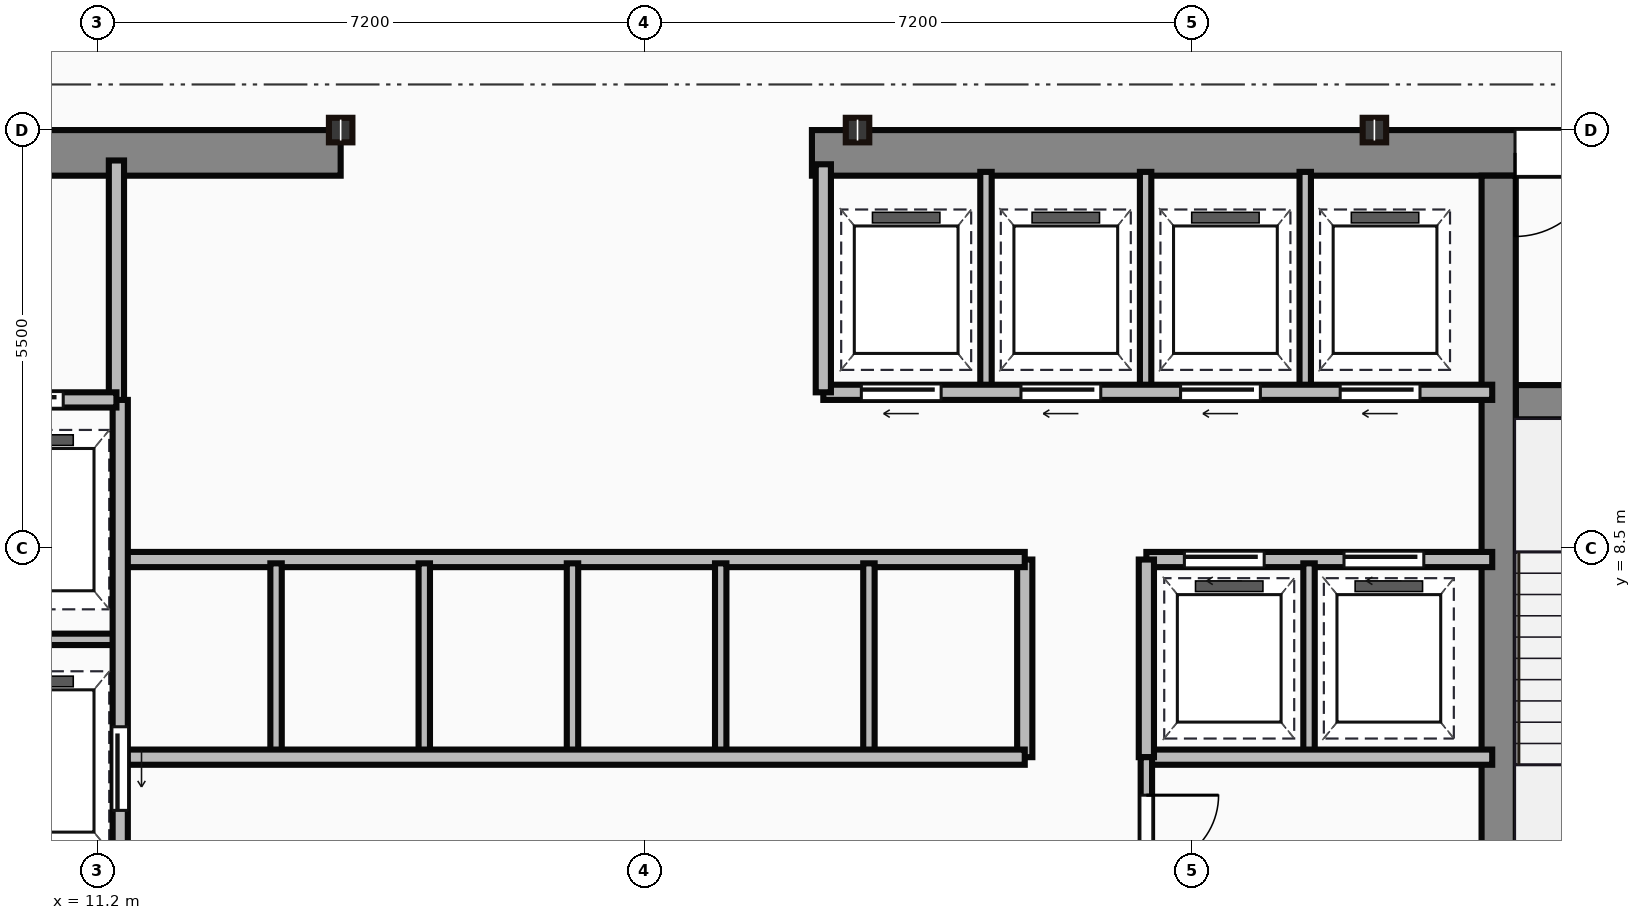
"""IFC4 building model, lengths in metres.
Left out: names, types, materials, properties, quantities, classifications, styles, units other than length and angle.
Written with IfcOpenShell. Run it as: python <this file> out.ifc"""

import sys

from ifc_helpers import new_model, si_unit, direction, frame, frame_2d, origin, origin_2d, place, context, subcontext, project, spatial, rectangle, i_section, extrude, source, transform, mapped, element, fill, save


model = new_model("IFC4")
c1 = context("Model", 3, precision=1e-05, world=origin(), true_north=direction((0.0, 1.0)))
c2 = subcontext(c1, "Body", "Model", "MODEL_VIEW")
j1 = project(units=[si_unit("LENGTHUNIT", "METRE"), si_unit("PLANEANGLEUNIT", "RADIAN")], contexts=[c1])
p1 = place(None, origin())
s1 = spatial("IfcSite", under=j1, at=p1, CompositionType="ELEMENT")
p2 = place(p1, origin())
s2 = spatial("IfcBuilding", under=s1, at=p2, CompositionType="ELEMENT")
p3 = place(p2, frame((0.0, 0.0, 188.6)))
s3 = spatial("IfcBuildingStorey", under=s2, at=p3, CompositionType="ELEMENT", Elevation=188.6)
m1 = source(origin(), c2, "Body", "SweptSolid", [
    extrude(rectangle(XDim=9.1, YDim=0.6, at=frame_2d((4.55, 0.0))), origin(), (0.0, 0.0, 1.0), 3.65),
])
p4 = place(p3, frame((5.3, 13.7, 0.0), z_axis=(0.0, 0.0, 1.0), x_axis=(1.0, 0.0, 0.0)))
e1 = element("IfcWall", 1, at=p4, inside=s3, PredefinedType="SHEAR", context=c2, shape_type="MappedRepresentation", body=[
    mapped(m1, transform((0.0, 0.0, 0.0))),
])
p5 = place(p4, frame((4.1, 0.0, 0.0)))
e2 = element("IfcOpeningElement", 2, at=p5, cuts=e1, PredefinedType="OPENING", context=c2, shape_type="SweptSolid", body=[
    extrude(rectangle(XDim=1.1, YDim=2.15, at=frame_2d((0.55, 1.075))), frame((0.0, 0.31, 0.0), z_axis=(0.0, -1.0, 0.0), x_axis=(1.0, 0.0, 0.0)), (0.0, 0.0, 1.0), 0.62),
])
m2 = source(origin(), c2, "Body", "SweptSolid", [
    extrude(rectangle(XDim=12.6, YDim=0.6, at=frame_2d((6.3, 0.0))), origin(), (0.0, 0.0, 1.0), 3.65),
])
p6 = place(p3, frame((20.6, 13.7, 0.0), z_axis=(0.0, 0.0, 1.0), x_axis=(1.0, 0.0, 0.0)))
e3 = element("IfcWall", 3, at=p6, inside=s3, PredefinedType="SHEAR", context=c2, shape_type="MappedRepresentation", body=[
    mapped(m2, transform((0.0, 0.0, 0.0))),
])
p7 = place(p6, frame((9.25, 0.0, 0.0)))
e4 = element("IfcOpeningElement", 4, at=p7, cuts=e3, PredefinedType="OPENING", context=c2, shape_type="SweptSolid", body=[
    extrude(rectangle(XDim=1.1, YDim=2.15, at=frame_2d((0.55, 1.075))), frame((0.0, 0.31, 0.0), z_axis=(0.0, -1.0, 0.0), x_axis=(1.0, 0.0, 0.0)), (0.0, 0.0, 1.0), 0.62),
])
m3 = source(origin(), c2, "Body", "SweptSolid", [
    extrude(rectangle(XDim=12.5, YDim=0.45, at=frame_2d((6.25, 0.0))), origin(), (0.0, 0.0, 1.0), 3.65),
])
p8 = place(p3, frame((29.635, 0.9, 0.0), z_axis=(0.0, 0.0, 1.0), x_axis=(0.0, 1.0, 0.0)))
e5 = element("IfcWall", 5, at=p8, inside=s3, PredefinedType="SHEAR", context=c2, shape_type="MappedRepresentation", body=[
    mapped(m3, transform((0.0, 0.0, 0.0))),
])
m4 = source(origin(), c2, "Body", "SweptSolid", [
    extrude(rectangle(XDim=3.39, YDim=0.45, at=frame_2d((1.695, 0.0))), origin(), (0.0, 0.0, 1.0), 3.65),
])
p9 = place(p3, frame((29.86, 10.42, 0.0), z_axis=(0.0, 0.0, 1.0), x_axis=(1.0, 0.0, 0.0)))
e6 = element("IfcWall", 6, at=p9, inside=s3, PredefinedType="SHEAR", context=c2, shape_type="MappedRepresentation", body=[
    mapped(m4, transform((0.0, 0.0, 0.0))),
])
p10 = place(p9, frame((1.1, 0.0, 0.0)))
e7 = element("IfcOpeningElement", 7, at=p10, cuts=e6, PredefinedType="OPENING", context=c2, shape_type="SweptSolid", body=[
    extrude(rectangle(XDim=1.1, YDim=2.15, at=frame_2d((0.55, 1.075))), frame((0.0, 0.235, 0.0), z_axis=(0.0, -1.0, 0.0), x_axis=(1.0, 0.0, 0.0)), (0.0, 0.0, 1.0), 0.47),
])
m5 = source(origin(), c2, "Body", "SweptSolid", [
    extrude(i_section(OverallWidth=0.309, OverallDepth=0.323, WebThickness=0.014, FlangeThickness=0.023, at=origin_2d()), origin(), (0.0, 0.0, 1.0), 3.65),
])
for number, where, z_axis, x_axis in (
    (8, (14.4, 14.0, 0.0), (0.0, 0.0, 1.0), (1.0, 0.0, 0.0)),
    (9, (21.2, 14.0, 0.0), (0.0, 0.0, 1.0), (1.0, 0.0, 0.0)),
    (10, (28.0, 14.0, 0.0), (0.0, 0.0, 1.0), (1.0, 0.0, 0.0)),
):
    element("IfcColumn", number, at=place(p3, frame(where, z_axis=z_axis, x_axis=x_axis)), inside=s3, PredefinedType="COLUMN", context=c2, shape_type="MappedRepresentation", body=[
        mapped(m5, transform((0.0, 0.0, 0.0))),
    ])
m6 = source(origin(), c2, "Body", "SweptSolid", [
    extrude(rectangle(XDim=3.18, YDim=0.2, at=frame_2d((1.59, 0.0))), origin(), (0.0, 0.0, 1.0), 3.4),
])
p11 = place(p3, frame((11.45, 10.42, 0.0), z_axis=(0.0, 0.0, 1.0), x_axis=(0.0, 1.0, 0.0)))
e11 = element("IfcWall", 11, at=p11, inside=s3, PredefinedType="PARTITIONING", context=c2, shape_type="MappedRepresentation", body=[
    mapped(m6, transform((0.0, 0.0, 0.0))),
])
m7 = source(origin(), c2, "Body", "SweptSolid", [
    extrude(rectangle(XDim=2.35, YDim=0.2, at=frame_2d((1.175, 0.0))), origin(), (0.0, 0.0, 1.0), 3.4),
])
p12 = place(p3, frame((9.1, 10.45, 0.0), z_axis=(0.0, 0.0, 1.0), x_axis=(1.0, 0.0, 0.0)))
e12 = element("IfcWall", 12, at=p12, inside=s3, PredefinedType="PARTITIONING", context=c2, shape_type="MappedRepresentation", body=[
    mapped(m7, transform((0.0, 0.0, 0.0))),
])
p13 = place(p12, frame((0.55, 0.0, 0.0)))
e13 = element("IfcOpeningElement", 13, at=p13, cuts=e12, PredefinedType="OPENING", context=c2, shape_type="SweptSolid", body=[
    extrude(rectangle(XDim=1.1, YDim=2.15, at=frame_2d((0.55, 1.075))), frame((0.0, 0.11, 0.0), z_axis=(0.0, -1.0, 0.0), x_axis=(1.0, 0.0, 0.0)), (0.0, 0.0, 1.0), 0.22),
])
m8 = source(origin(), c2, "Body", "SweptSolid", [
    extrude(rectangle(XDim=9.6, YDim=0.2, at=frame_2d((4.8, 0.0))), origin(), (0.0, 0.0, 1.0), 3.4),
])
p14 = place(p3, frame((11.5, 0.85, 0.0), z_axis=(0.0, 0.0, 1.0), x_axis=(0.0, 1.0, 0.0)))
e14 = element("IfcWall", 14, at=p14, inside=s3, PredefinedType="PARTITIONING", context=c2, shape_type="MappedRepresentation", body=[
    mapped(m8, transform((0.0, 0.0, 0.0))),
])
p15 = place(p14, frame((4.2, 0.0, 0.0)))
e15 = element("IfcOpeningElement", 15, at=p15, cuts=e14, PredefinedType="OPENING", context=c2, shape_type="SweptSolid", body=[
    extrude(rectangle(XDim=1.1, YDim=2.15, at=frame_2d((0.55, 1.075))), frame((0.0, 0.11, 0.0), z_axis=(0.0, -1.0, 0.0), x_axis=(1.0, 0.0, 0.0)), (0.0, 0.0, 1.0), 0.22),
])
p16 = place(p14, frame((0.9, 0.0, 0.0)))
e16 = element("IfcOpeningElement", 16, at=p16, cuts=e14, PredefinedType="OPENING", context=c2, shape_type="SweptSolid", body=[
    extrude(rectangle(XDim=1.2, YDim=2.15, at=frame_2d((0.6, 1.075))), frame((0.0, 0.11, 0.0), z_axis=(0.0, -1.0, 0.0), x_axis=(1.0, 0.0, 0.0)), (0.0, 0.0, 1.0), 0.22),
])
m9 = source(origin(), c2, "Body", "SweptSolid", [
    extrude(rectangle(XDim=2.4, YDim=0.15, at=frame_2d((1.2, 0.0))), origin(), (0.0, 0.0, 1.0), 3.4),
])
p17 = place(p3, frame((9.1, 7.3, 0.0), z_axis=(0.0, 0.0, 1.0), x_axis=(1.0, 0.0, 0.0)))
e17 = element("IfcWall", 17, at=p17, inside=s3, PredefinedType="PARTITIONING", context=c2, shape_type="MappedRepresentation", body=[
    mapped(m9, transform((0.0, 0.0, 0.0))),
])
m10 = source(origin(), c2, "Body", "SweptSolid", [
    extrude(rectangle(XDim=11.85, YDim=0.2, at=frame_2d((5.925, 0.0))), origin(), (0.0, 0.0, 1.0), 3.4),
])
for number, where, z_axis, x_axis in (
    (18, (11.55, 5.75, 0.0), (0.0, 0.0, 1.0), (1.0, 0.0, 0.0)),
    (19, (11.55, 8.35, 0.0), (0.0, 0.0, 1.0), (1.0, 0.0, 0.0)),
):
    element("IfcWall", number, at=place(p3, frame(where, z_axis=z_axis, x_axis=x_axis)), inside=s3, PredefinedType="PARTITIONING", context=c2, shape_type="MappedRepresentation", body=[
        mapped(m10, transform((0.0, 0.0, 0.0))),
    ])
m11 = source(origin(), c2, "Body", "SweptSolid", [
    extrude(rectangle(XDim=2.6, YDim=0.2, at=frame_2d((1.3, 0.0))), origin(), (0.0, 0.0, 1.0), 3.4),
])
p18 = place(p3, frame((23.4, 5.75, 0.0), z_axis=(0.0, 0.0, 1.0), x_axis=(0.0, 1.0, 0.0)))
e20 = element("IfcWall", 20, at=p18, inside=s3, PredefinedType="PARTITIONING", context=c2, shape_type="MappedRepresentation", body=[
    mapped(m11, transform((0.0, 0.0, 0.0))),
])
m12 = source(origin(), c2, "Body", "SweptSolid", [
    extrude(rectangle(XDim=2.5, YDim=0.15, at=frame_2d((1.25, 0.0))), origin(), (0.0, 0.0, 1.0), 3.4),
])
for number, where, z_axis, x_axis in (
    (21, (13.55, 5.8, 0.0), (0.0, 0.0, 1.0), (0.0, 1.0, 0.0)),
    (22, (15.5, 5.8, 0.0), (0.0, 0.0, 1.0), (0.0, 1.0, 0.0)),
    (23, (17.45, 5.8, 0.0), (0.0, 0.0, 1.0), (0.0, 1.0, 0.0)),
    (24, (19.4, 5.8, 0.0), (0.0, 0.0, 1.0), (0.0, 1.0, 0.0)),
    (25, (21.35, 5.8, 0.0), (0.0, 0.0, 1.0), (0.0, 1.0, 0.0)),
):
    element("IfcWall", number, at=place(p3, frame(where, z_axis=z_axis, x_axis=x_axis)), inside=s3, PredefinedType="PARTITIONING", context=c2, shape_type="MappedRepresentation", body=[
        mapped(m12, transform((0.0, 0.0, 0.0))),
    ])
m13 = source(origin(), c2, "Body", "SweptSolid", [
    extrude(rectangle(XDim=8.8, YDim=0.2, at=frame_2d((4.4, 0.0))), origin(), (0.0, 0.0, 1.0), 3.4),
])
p19 = place(p3, frame((20.75, 10.55, 0.0), z_axis=(0.0, 0.0, 1.0), x_axis=(1.0, 0.0, 0.0)))
e26 = element("IfcWall", 26, at=p19, inside=s3, PredefinedType="PARTITIONING", context=c2, shape_type="MappedRepresentation", body=[
    mapped(m13, transform((0.0, 0.0, 0.0))),
])
p20 = place(p19, frame((0.5, 0.0, 0.0)))
e27 = element("IfcOpeningElement", 27, at=p20, cuts=e26, PredefinedType="OPENING", context=c2, shape_type="SweptSolid", body=[
    extrude(rectangle(XDim=1.05, YDim=2.15, at=frame_2d((0.525, 1.075))), frame((0.0, 0.11, 0.0), z_axis=(0.0, -1.0, 0.0), x_axis=(1.0, 0.0, 0.0)), (0.0, 0.0, 1.0), 0.22),
])
p21 = place(p19, frame((2.6, 0.0, 0.0)))
e28 = element("IfcOpeningElement", 28, at=p21, cuts=e26, PredefinedType="OPENING", context=c2, shape_type="SweptSolid", body=[
    extrude(rectangle(XDim=1.05, YDim=2.15, at=frame_2d((0.525, 1.075))), frame((0.0, 0.11, 0.0), z_axis=(0.0, -1.0, 0.0), x_axis=(1.0, 0.0, 0.0)), (0.0, 0.0, 1.0), 0.22),
])
p22 = place(p19, frame((4.7, 0.0, 0.0)))
e29 = element("IfcOpeningElement", 29, at=p22, cuts=e26, PredefinedType="OPENING", context=c2, shape_type="SweptSolid", body=[
    extrude(rectangle(XDim=1.05, YDim=2.15, at=frame_2d((0.525, 1.075))), frame((0.0, 0.11, 0.0), z_axis=(0.0, -1.0, 0.0), x_axis=(1.0, 0.0, 0.0)), (0.0, 0.0, 1.0), 0.22),
])
p23 = place(p19, frame((6.8, 0.0, 0.0)))
e30 = element("IfcOpeningElement", 30, at=p23, cuts=e26, PredefinedType="OPENING", context=c2, shape_type="SweptSolid", body=[
    extrude(rectangle(XDim=1.05, YDim=2.15, at=frame_2d((0.525, 1.075))), frame((0.0, 0.11, 0.0), z_axis=(0.0, -1.0, 0.0), x_axis=(1.0, 0.0, 0.0)), (0.0, 0.0, 1.0), 0.22),
])
m14 = source(origin(), c2, "Body", "SweptSolid", [
    extrude(rectangle(XDim=3.0, YDim=0.2, at=frame_2d((1.5, 0.0))), origin(), (0.0, 0.0, 1.0), 3.4),
])
p24 = place(p3, frame((20.75, 10.55, 0.0), z_axis=(0.0, 0.0, 1.0), x_axis=(0.0, 1.0, 0.0)))
e31 = element("IfcWall", 31, at=p24, inside=s3, PredefinedType="PARTITIONING", context=c2, shape_type="MappedRepresentation", body=[
    mapped(m14, transform((0.0, 0.0, 0.0))),
])
m15 = source(origin(), c2, "Body", "SweptSolid", [
    extrude(rectangle(XDim=2.85, YDim=0.15, at=frame_2d((1.425, 0.0))), origin(), (0.0, 0.0, 1.0), 3.4),
])
for number, where, z_axis, x_axis in (
    (32, (22.89, 10.6, 0.0), (0.0, 0.0, 1.0), (0.0, 1.0, 0.0)),
    (33, (24.99, 10.6, 0.0), (0.0, 0.0, 1.0), (0.0, 1.0, 0.0)),
    (34, (27.09, 10.6, 0.0), (0.0, 0.0, 1.0), (0.0, 1.0, 0.0)),
):
    element("IfcWall", number, at=place(p3, frame(where, z_axis=z_axis, x_axis=x_axis)), inside=s3, PredefinedType="PARTITIONING", context=c2, shape_type="MappedRepresentation", body=[
        mapped(m15, transform((0.0, 0.0, 0.0))),
    ])
m16 = source(origin(), c2, "Body", "SweptSolid", [
    extrude(rectangle(XDim=4.55, YDim=0.2, at=frame_2d((2.275, 0.0))), origin(), (0.0, 0.0, 1.0), 3.4),
])
p25 = place(p3, frame((25.0, 8.35, 0.0), z_axis=(0.0, 0.0, 1.0), x_axis=(1.0, 0.0, 0.0)))
e35 = element("IfcWall", 35, at=p25, inside=s3, PredefinedType="PARTITIONING", context=c2, shape_type="MappedRepresentation", body=[
    mapped(m16, transform((0.0, 0.0, 0.0))),
])
p26 = place(p25, frame((0.5, 0.0, 0.0)))
e36 = element("IfcOpeningElement", 36, at=p26, cuts=e35, PredefinedType="OPENING", context=c2, shape_type="SweptSolid", body=[
    extrude(rectangle(XDim=1.05, YDim=2.15, at=frame_2d((0.525, 1.075))), frame((0.0, 0.11, 0.0), z_axis=(0.0, -1.0, 0.0), x_axis=(1.0, 0.0, 0.0)), (0.0, 0.0, 1.0), 0.22),
])
p27 = place(p25, frame((2.6, 0.0, 0.0)))
e37 = element("IfcOpeningElement", 37, at=p27, cuts=e35, PredefinedType="OPENING", context=c2, shape_type="SweptSolid", body=[
    extrude(rectangle(XDim=1.05, YDim=2.15, at=frame_2d((0.525, 1.075))), frame((0.0, 0.11, 0.0), z_axis=(0.0, -1.0, 0.0), x_axis=(1.0, 0.0, 0.0)), (0.0, 0.0, 1.0), 0.22),
])
p28 = place(p3, frame((25.0, 5.75, 0.0), z_axis=(0.0, 0.0, 1.0), x_axis=(1.0, 0.0, 0.0)))
e38 = element("IfcWall", 38, at=p28, inside=s3, PredefinedType="PARTITIONING", context=c2, shape_type="MappedRepresentation", body=[
    mapped(m16, transform((0.0, 0.0, 0.0))),
])
p29 = place(p3, frame((25.0, 5.75, 0.0), z_axis=(0.0, 0.0, 1.0), x_axis=(0.0, 1.0, 0.0)))
e39 = element("IfcWall", 39, at=p29, inside=s3, PredefinedType="PARTITIONING", context=c2, shape_type="MappedRepresentation", body=[
    mapped(m11, transform((0.0, 0.0, 0.0))),
])
p30 = place(p3, frame((27.14, 5.8, 0.0), z_axis=(0.0, 0.0, 1.0), x_axis=(0.0, 1.0, 0.0)))
e40 = element("IfcWall", 40, at=p30, inside=s3, PredefinedType="PARTITIONING", context=c2, shape_type="MappedRepresentation", body=[
    mapped(m12, transform((0.0, 0.0, 0.0))),
])
m17 = source(origin(), c2, "Body", "SweptSolid", [
    extrude(rectangle(XDim=4.9, YDim=0.15, at=frame_2d((2.45, 0.0))), origin(), (0.0, 0.0, 1.0), 3.4),
])
p31 = place(p3, frame((25.0, 0.85, 0.0), z_axis=(0.0, 0.0, 1.0), x_axis=(0.0, 1.0, 0.0)))
e41 = element("IfcWall", 41, at=p31, inside=s3, PredefinedType="PARTITIONING", context=c2, shape_type="MappedRepresentation", body=[
    mapped(m17, transform((0.0, 0.0, 0.0))),
])
p32 = place(p31, frame((1.8, 0.0, 0.0)))
e42 = element("IfcOpeningElement", 42, at=p32, cuts=e41, PredefinedType="OPENING", context=c2, shape_type="SweptSolid", body=[
    extrude(rectangle(XDim=0.95, YDim=2.15, at=frame_2d((0.475, 1.075))), frame((0.0, 0.085, 0.0), z_axis=(0.0, -1.0, 0.0), x_axis=(1.0, 0.0, 0.0)), (0.0, 0.0, 1.0), 0.17),
])
p33 = place(p31, frame((3.45, 0.0, 0.0)))
e43 = element("IfcOpeningElement", 43, at=p33, cuts=e41, PredefinedType="OPENING", context=c2, shape_type="SweptSolid", body=[
    extrude(rectangle(XDim=0.95, YDim=2.15, at=frame_2d((0.475, 1.075))), frame((0.0, 0.085, 0.0), z_axis=(0.0, -1.0, 0.0), x_axis=(1.0, 0.0, 0.0)), (0.0, 0.0, 1.0), 0.17),
])
m18 = source(origin(), c2, "Body", "SweptSolid", [
    extrude(rectangle(XDim=1.1, YDim=2.15, at=frame_2d((0.55, 1.075))), frame((0.0, 0.025, 0.0), z_axis=(0.0, -1.0, 0.0), x_axis=(1.0, 0.0, 0.0)), (0.0, 0.0, 1.0), 0.05),
])
p34 = place(p7, origin())
e44 = element("IfcDoor", 44, at=p34, inside=s3, OperationType="SINGLE_SWING_LEFT", PredefinedType="DOOR", context=c2, shape_type="MappedRepresentation", body=[
    mapped(m18, transform((0.0, 0.0, 0.0))),
])
fill(e4, e44)
p35 = place(p13, origin())
e45 = element("IfcDoor", 45, at=p35, inside=s3, OperationType="SLIDING_TO_LEFT", PredefinedType="DOOR", context=c2, shape_type="MappedRepresentation", body=[
    mapped(m18, transform((0.0, 0.0, 0.0))),
])
fill(e13, e45)
p36 = place(p15, frame((1.1, 0.0, 0.0), z_axis=(0.0, 0.0, 1.0), x_axis=(-1.0, 0.0, 0.0)))
e46 = element("IfcDoor", 46, at=p36, inside=s3, OperationType="SLIDING_TO_LEFT", PredefinedType="DOOR", context=c2, shape_type="MappedRepresentation", body=[
    mapped(m18, transform((0.0, 0.0, 0.0))),
])
fill(e15, e46)
m19 = source(origin(), c2, "Body", "SweptSolid", [
    extrude(rectangle(XDim=1.05, YDim=2.15, at=frame_2d((0.525, 1.075))), frame((0.0, 0.025, 0.0), z_axis=(0.0, -1.0, 0.0), x_axis=(1.0, 0.0, 0.0)), (0.0, 0.0, 1.0), 0.05),
])
p37 = place(p20, frame((1.05, 0.0, 0.0), z_axis=(0.0, 0.0, 1.0), x_axis=(-1.0, 0.0, 0.0)))
e47 = element("IfcDoor", 47, at=p37, inside=s3, OperationType="SLIDING_TO_LEFT", PredefinedType="DOOR", context=c2, shape_type="MappedRepresentation", body=[
    mapped(m19, transform((0.0, 0.0, 0.0))),
])
fill(e27, e47)
p38 = place(p21, frame((1.05, 0.0, 0.0), z_axis=(0.0, 0.0, 1.0), x_axis=(-1.0, 0.0, 0.0)))
e48 = element("IfcDoor", 48, at=p38, inside=s3, OperationType="SLIDING_TO_LEFT", PredefinedType="DOOR", context=c2, shape_type="MappedRepresentation", body=[
    mapped(m19, transform((0.0, 0.0, 0.0))),
])
fill(e28, e48)
p39 = place(p22, frame((1.05, 0.0, 0.0), z_axis=(0.0, 0.0, 1.0), x_axis=(-1.0, 0.0, 0.0)))
e49 = element("IfcDoor", 49, at=p39, inside=s3, OperationType="SLIDING_TO_LEFT", PredefinedType="DOOR", context=c2, shape_type="MappedRepresentation", body=[
    mapped(m19, transform((0.0, 0.0, 0.0))),
])
fill(e29, e49)
p40 = place(p23, frame((1.05, 0.0, 0.0), z_axis=(0.0, 0.0, 1.0), x_axis=(-1.0, 0.0, 0.0)))
e50 = element("IfcDoor", 50, at=p40, inside=s3, OperationType="SLIDING_TO_LEFT", PredefinedType="DOOR", context=c2, shape_type="MappedRepresentation", body=[
    mapped(m19, transform((0.0, 0.0, 0.0))),
])
fill(e30, e50)
p41 = place(p26, origin())
e51 = element("IfcDoor", 51, at=p41, inside=s3, OperationType="SLIDING_TO_LEFT", PredefinedType="DOOR", context=c2, shape_type="MappedRepresentation", body=[
    mapped(m19, transform((0.0, 0.0, 0.0))),
])
fill(e36, e51)
p42 = place(p27, origin())
e52 = element("IfcDoor", 52, at=p42, inside=s3, OperationType="SLIDING_TO_LEFT", PredefinedType="DOOR", context=c2, shape_type="MappedRepresentation", body=[
    mapped(m19, transform((0.0, 0.0, 0.0))),
])
fill(e37, e52)
m20 = source(origin(), c2, "Body", "SweptSolid", [
    extrude(rectangle(XDim=0.95, YDim=2.15, at=frame_2d((0.475, 1.075))), frame((0.0, 0.025, 0.0), z_axis=(0.0, -1.0, 0.0), x_axis=(1.0, 0.0, 0.0)), (0.0, 0.0, 1.0), 0.05),
])
p43 = place(p33, origin())
e53 = element("IfcDoor", 53, at=p43, inside=s3, OperationType="SINGLE_SWING_RIGHT", PredefinedType="DOOR", context=c2, shape_type="MappedRepresentation", body=[
    mapped(m20, transform((0.0, 0.0, 0.0))),
])
fill(e43, e53)
save(model, sys.argv[1])
